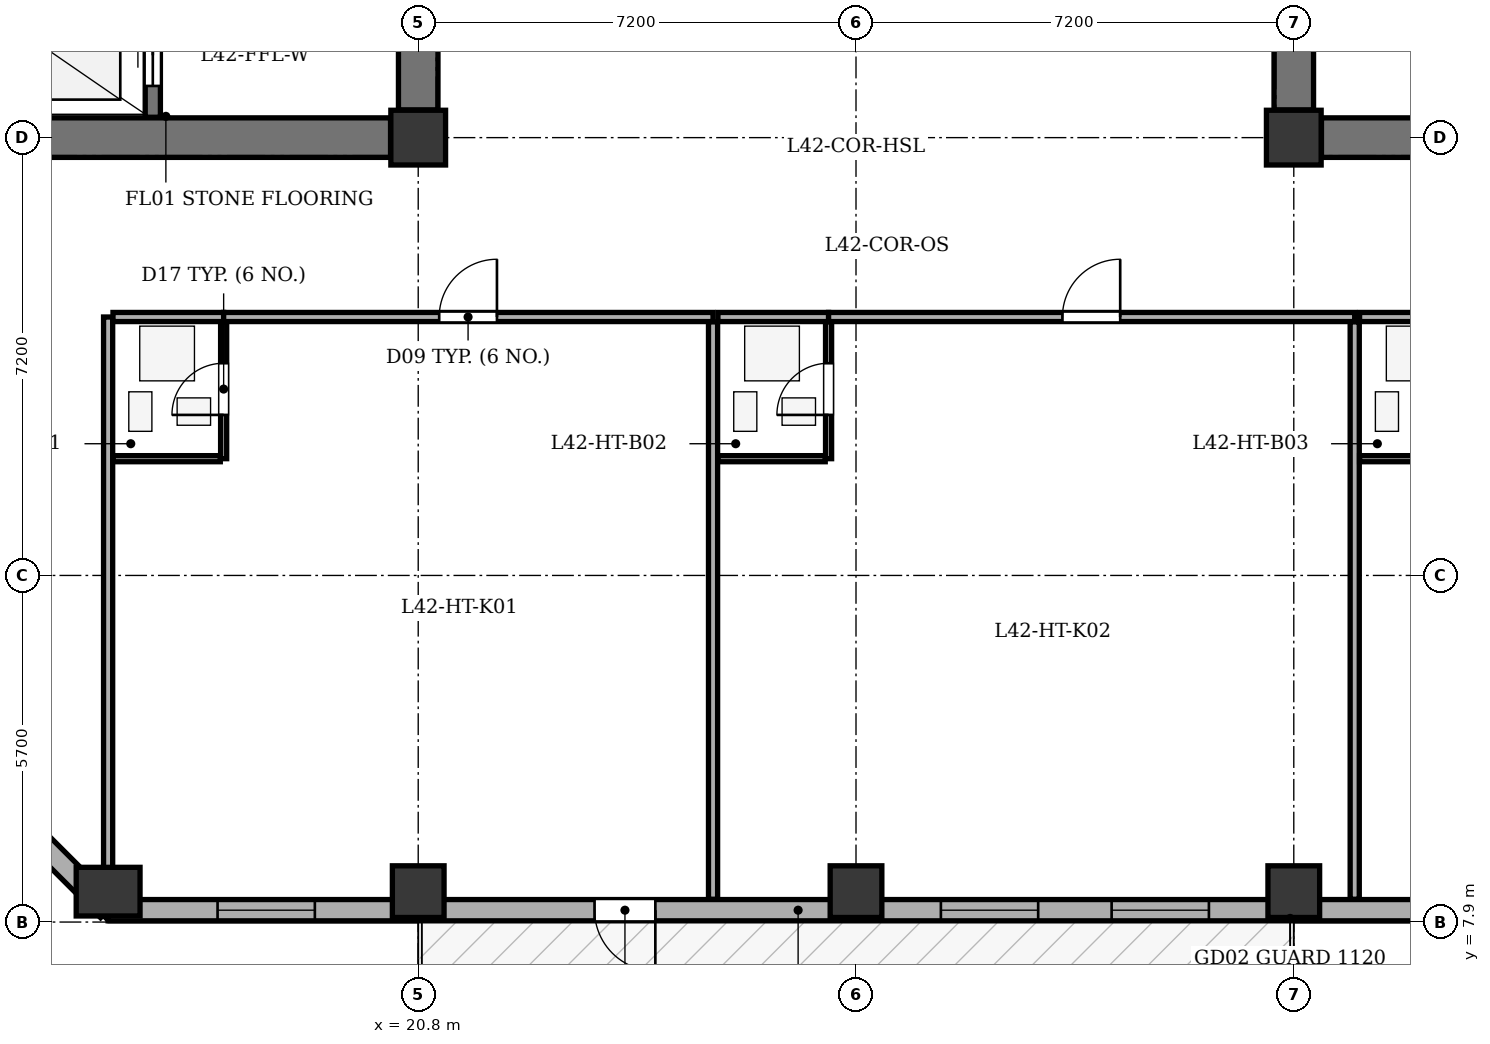
"""IFC4 building model, lengths in metres.
Left out: names, types, materials, properties, quantities, classifications, styles, units other than length and angle.
Written with IfcOpenShell. Run it as: python <this file> out.ifc"""

import sys

from ifc_helpers import new_model, si_unit, direction, frame, frame_2d, origin, origin_2d, place, context, subcontext, project, spatial, rectangle, extrude, element, fill, save


model = new_model("IFC4")
c1 = context("Model", 3, precision=1e-05, world=origin(), true_north=direction((0.0, 1.0)))
c2 = subcontext(c1, "Body", "Model", "MODEL_VIEW")
j1 = project(units=[si_unit("LENGTHUNIT", "METRE"), si_unit("PLANEANGLEUNIT", "RADIAN")], contexts=[c1])
p1 = place(None, origin())
s1 = spatial("IfcSite", under=j1, at=p1, CompositionType="ELEMENT")
p2 = place(p1, origin())
s2 = spatial("IfcBuilding", under=s1, at=p2, CompositionType="ELEMENT")
p3 = place(p2, frame((0.0, 0.0, 165.8)))
s3 = spatial("IfcBuildingStorey", under=s2, at=p3, CompositionType="ELEMENT", Elevation=165.8)
for number, where, z_axis, x_axis in (
    (1, (20.8, 20.8, 0.0), (0.0, 0.0, 1.0), (1.0, 0.0, 0.0)),
    (2, (35.2, 20.8, 0.0), (0.0, 0.0, 1.0), (1.0, 0.0, 0.0)),
):
    element("IfcColumn", number, at=place(p3, frame(where, z_axis=z_axis, x_axis=x_axis)), inside=s3, PredefinedType="COLUMN", context=c2, shape_type="SweptSolid", body=[
        extrude(rectangle(XDim=0.9, YDim=0.9, at=origin_2d()), origin(), (0.0, 0.0, 1.0), 3.5),
    ])
p4 = place(p3, frame((15.7, 8.4, 0.0), z_axis=(0.0, 0.0, 1.0), x_axis=(1.0, 0.0, 0.0)))
e3 = element("IfcColumn", 3, at=p4, inside=s3, PredefinedType="COLUMN", context=c2, shape_type="SweptSolid", body=[
    extrude(rectangle(XDim=0.8, YDim=1.05, at=origin_2d()), origin(), (0.0, 0.0, 1.0), 3.5),
])
for number, where, z_axis, x_axis in (
    (4, (20.8, 8.4, 0.0), (0.0, 0.0, 1.0), (1.0, 0.0, 0.0)),
    (5, (28.0, 8.4, 0.0), (0.0, 0.0, 1.0), (1.0, 0.0, 0.0)),
    (6, (35.2, 8.4, 0.0), (0.0, 0.0, 1.0), (1.0, 0.0, 0.0)),
):
    element("IfcColumn", number, at=place(p3, frame(where, z_axis=z_axis, x_axis=x_axis)), inside=s3, PredefinedType="COLUMN", context=c2, shape_type="SweptSolid", body=[
        extrude(rectangle(XDim=0.85, YDim=0.85, at=origin_2d()), origin(), (0.0, 0.0, 1.0), 3.5),
    ])
p5 = place(p3, frame((50.7, 8.095, 0.0), z_axis=(0.0, 0.0, 1.0), x_axis=(-1.0, 0.0, 0.0)))
e7 = element("IfcWall", 7, at=p5, inside=s3, PredefinedType="STANDARD", context=c2, shape_type="SweptSolid", body=[
    extrude(rectangle(XDim=35.0, YDim=0.35, at=frame_2d((17.5, 0.0))), origin(), (0.0, 0.0, 1.0), 2.785),
])
p6 = place(p5, frame((26.0, 0.0, 0.0)))
e8 = element("IfcOpeningElement", 8, at=p6, cuts=e7, PredefinedType="OPENING", context=c2, shape_type="SweptSolid", body=[
    extrude(rectangle(XDim=1.0, YDim=2.02, at=frame_2d((0.5, 1.01))), frame((0.0, 0.185, 0.0), z_axis=(0.0, -1.0, 0.0), x_axis=(1.0, 0.0, 0.0)), (0.0, 0.0, 1.0), 0.37),
])
p7 = place(p5, frame((1.763, 0.0, 0.75)))
e9 = element("IfcOpeningElement", 9, at=p7, cuts=e7, PredefinedType="OPENING", context=c2, shape_type="SweptSolid", body=[
    extrude(rectangle(XDim=1.6, YDim=1.75, at=frame_2d((0.8, 0.875))), frame((0.0, 0.185, 0.0), z_axis=(0.0, -1.0, 0.0), x_axis=(1.0, 0.0, 0.0)), (0.0, 0.0, 1.0), 0.37),
])
p8 = place(p5, frame((6.798, 0.0, 0.75)))
e10 = element("IfcOpeningElement", 10, at=p8, cuts=e7, PredefinedType="OPENING", context=c2, shape_type="SweptSolid", body=[
    extrude(rectangle(XDim=1.6, YDim=1.75, at=frame_2d((0.8, 0.875))), frame((0.0, 0.185, 0.0), z_axis=(0.0, -1.0, 0.0), x_axis=(1.0, 0.0, 0.0)), (0.0, 0.0, 1.0), 0.37),
])
p9 = place(p5, frame((10.7, 0.0, 0.75)))
e11 = element("IfcOpeningElement", 11, at=p9, cuts=e7, PredefinedType="OPENING", context=c2, shape_type="SweptSolid", body=[
    extrude(rectangle(XDim=2.1, YDim=1.75, at=frame_2d((1.05, 0.875))), frame((0.0, 0.185, 0.0), z_axis=(0.0, -1.0, 0.0), x_axis=(1.0, 0.0, 0.0)), (0.0, 0.0, 1.0), 0.37),
])
p10 = place(p5, frame((16.896, 0.0, 0.75)))
e12 = element("IfcOpeningElement", 12, at=p10, cuts=e7, PredefinedType="OPENING", context=c2, shape_type="SweptSolid", body=[
    extrude(rectangle(XDim=1.6, YDim=1.75, at=frame_2d((0.8, 0.875))), frame((0.0, 0.185, 0.0), z_axis=(0.0, -1.0, 0.0), x_axis=(1.0, 0.0, 0.0)), (0.0, 0.0, 1.0), 0.37),
])
p11 = place(p5, frame((19.704, 0.0, 0.75)))
e13 = element("IfcOpeningElement", 13, at=p11, cuts=e7, PredefinedType="OPENING", context=c2, shape_type="SweptSolid", body=[
    extrude(rectangle(XDim=1.6, YDim=1.75, at=frame_2d((0.8, 0.875))), frame((0.0, 0.185, 0.0), z_axis=(0.0, -1.0, 0.0), x_axis=(1.0, 0.0, 0.0)), (0.0, 0.0, 1.0), 0.37),
])
p12 = place(p5, frame((31.6, 0.0, 0.75)))
e14 = element("IfcOpeningElement", 14, at=p12, cuts=e7, PredefinedType="OPENING", context=c2, shape_type="SweptSolid", body=[
    extrude(rectangle(XDim=1.6, YDim=1.75, at=frame_2d((0.8, 0.875))), frame((0.0, 0.185, 0.0), z_axis=(0.0, -1.0, 0.0), x_axis=(1.0, 0.0, 0.0)), (0.0, 0.0, 1.0), 0.37),
])
p13 = place(p3, frame((15.7, 8.095, 0.0), z_axis=(0.0, 0.0, 1.0), x_axis=(-0.707106781187, 0.707106781187, 0.0)))
e15 = element("IfcWall", 15, at=p13, inside=s3, PredefinedType="STANDARD", context=c2, shape_type="SweptSolid", body=[
    extrude(rectangle(XDim=6.795, YDim=0.35, at=frame_2d((3.397, 0.0))), origin(), (0.0, 0.0, 1.0), 2.785),
])
p14 = place(p13, frame((2.698, 0.0, 0.75)))
e16 = element("IfcOpeningElement", 16, at=p14, cuts=e15, PredefinedType="OPENING", context=c2, shape_type="SweptSolid", body=[
    extrude(rectangle(XDim=1.4, YDim=1.65, at=frame_2d((0.7, 0.825))), frame((0.0, 0.185, 0.0), z_axis=(0.0, -1.0, 0.0), x_axis=(1.0, 0.0, 0.0)), (0.0, 0.0, 1.0), 0.37),
])
p15 = place(p3, frame((13.255, 20.8, 0.0), z_axis=(0.0, 0.0, 1.0), x_axis=(1.0, 0.0, 0.0)))
e17 = element("IfcWall", 17, at=p15, inside=s3, PredefinedType="SHEAR", context=c2, shape_type="SweptSolid", body=[
    extrude(rectangle(XDim=7.09, YDim=0.65, at=frame_2d((3.545, 0.0))), origin(), (0.0, 0.0, 1.0), 3.2),
])
p16 = place(p3, frame((20.8, 21.255, 0.0), z_axis=(0.0, 0.0, 1.0), x_axis=(0.0, 1.0, 0.0)))
e18 = element("IfcWall", 18, at=p16, inside=s3, PredefinedType="SHEAR", context=c2, shape_type="SweptSolid", body=[
    extrude(rectangle(XDim=3.795, YDim=0.65, at=frame_2d((1.897, 0.0))), origin(), (0.0, 0.0, 1.0), 3.2),
])
p17 = place(p16, frame((1.345, 0.0, 0.0)))
e19 = element("IfcOpeningElement", 19, at=p17, cuts=e18, PredefinedType="OPENING", context=c2, shape_type="SweptSolid", body=[
    extrude(rectangle(XDim=1.2, YDim=2.15, at=frame_2d((0.6, 1.075))), frame((0.0, 0.335, 0.0), z_axis=(0.0, -1.0, 0.0), x_axis=(1.0, 0.0, 0.0)), (0.0, 0.0, 1.0), 0.67),
])
p18 = place(p3, frame((16.435, 21.135, 0.0), z_axis=(0.0, 0.0, 1.0), x_axis=(0.0, 1.0, 0.0)))
e20 = element("IfcWall", 20, at=p18, inside=s3, PredefinedType="SHEAR", context=c2, shape_type="SweptSolid", body=[
    extrude(rectangle(XDim=12.13, YDim=0.25, at=frame_2d((6.065, 0.0))), origin(), (0.0, 0.0, 1.0), 3.2),
])
p19 = place(p18, frame((0.515, 0.0, 0.0)))
e21 = element("IfcOpeningElement", 21, at=p19, cuts=e20, PredefinedType="OPENING", context=c2, shape_type="SweptSolid", body=[
    extrude(rectangle(XDim=1.2, YDim=2.15, at=frame_2d((0.6, 1.075))), frame((0.0, 0.135, 0.0), z_axis=(0.0, -1.0, 0.0), x_axis=(1.0, 0.0, 0.0)), (0.0, 0.0, 1.0), 0.27),
])
p20 = place(p18, frame((2.665, 0.0, 0.0)))
e22 = element("IfcOpeningElement", 22, at=p20, cuts=e20, PredefinedType="OPENING", context=c2, shape_type="SweptSolid", body=[
    extrude(rectangle(XDim=1.15, YDim=2.15, at=frame_2d((0.575, 1.075))), frame((0.0, 0.135, 0.0), z_axis=(0.0, -1.0, 0.0), x_axis=(1.0, 0.0, 0.0)), (0.0, 0.0, 1.0), 0.27),
])
p21 = place(p3, frame((35.655, 20.8, 0.0), z_axis=(0.0, 0.0, 1.0), x_axis=(1.0, 0.0, 0.0)))
e23 = element("IfcWall", 23, at=p21, inside=s3, PredefinedType="SHEAR", context=c2, shape_type="SweptSolid", body=[
    extrude(rectangle(XDim=7.09, YDim=0.65, at=frame_2d((3.545, 0.0))), origin(), (0.0, 0.0, 1.0), 3.2),
])
p22 = place(p3, frame((35.2, 21.255, 0.0), z_axis=(0.0, 0.0, 1.0), x_axis=(0.0, 1.0, 0.0)))
e24 = element("IfcWall", 24, at=p22, inside=s3, PredefinedType="SHEAR", context=c2, shape_type="SweptSolid", body=[
    extrude(rectangle(XDim=11.89, YDim=0.65, at=frame_2d((5.945, 0.0))), origin(), (0.0, 0.0, 1.0), 3.2),
])
p23 = place(p22, frame((1.345, 0.0, 0.0)))
e25 = element("IfcOpeningElement", 25, at=p23, cuts=e24, PredefinedType="OPENING", context=c2, shape_type="SweptSolid", body=[
    extrude(rectangle(XDim=1.2, YDim=2.15, at=frame_2d((0.6, 1.075))), frame((0.0, 0.335, 0.0), z_axis=(0.0, -1.0, 0.0), x_axis=(1.0, 0.0, 0.0)), (0.0, 0.0, 1.0), 0.67),
])
p24 = place(p22, frame((4.345, 0.0, 0.0)))
e26 = element("IfcOpeningElement", 26, at=p24, cuts=e24, PredefinedType="OPENING", context=c2, shape_type="SweptSolid", body=[
    extrude(rectangle(XDim=1.1, YDim=2.1, at=frame_2d((0.55, 1.05))), frame((0.0, 0.335, 0.0), z_axis=(0.0, -1.0, 0.0), x_axis=(1.0, 0.0, 0.0)), (0.0, 0.0, 1.0), 0.67),
])
p25 = place(p22, frame((6.295, 0.0, 0.0)))
e27 = element("IfcOpeningElement", 27, at=p25, cuts=e24, PredefinedType="OPENING", context=c2, shape_type="SweptSolid", body=[
    extrude(rectangle(XDim=1.1, YDim=2.1, at=frame_2d((0.55, 1.05))), frame((0.0, 0.335, 0.0), z_axis=(0.0, -1.0, 0.0), x_axis=(1.0, 0.0, 0.0)), (0.0, 0.0, 1.0), 0.67),
])
p26 = place(p22, frame((8.245, 0.0, 0.0)))
e28 = element("IfcOpeningElement", 28, at=p26, cuts=e24, PredefinedType="OPENING", context=c2, shape_type="SweptSolid", body=[
    extrude(rectangle(XDim=1.1, YDim=2.1, at=frame_2d((0.55, 1.05))), frame((0.0, 0.335, 0.0), z_axis=(0.0, -1.0, 0.0), x_axis=(1.0, 0.0, 0.0)), (0.0, 0.0, 1.0), 0.67),
])
p27 = place(p3, frame((15.7, 8.275, 0.0), z_axis=(0.0, 0.0, 1.0), x_axis=(0.0, 1.0, 0.0)))
e29 = element("IfcWall", 29, at=p27, inside=s3, PredefinedType="PARTITIONING", context=c2, shape_type="SweptSolid", body=[
    extrude(rectangle(XDim=9.575, YDim=0.15, at=frame_2d((4.788, 0.0))), origin(), (0.0, 0.0, 1.0), 3.2),
])
p28 = place(p3, frame((15.78, 17.85, 0.0), z_axis=(0.0, 0.0, 1.0), x_axis=(1.0, 0.0, 0.0)))
e30 = element("IfcWall", 30, at=p28, inside=s3, PredefinedType="PARTITIONING", context=c2, shape_type="SweptSolid", body=[
    extrude(rectangle(XDim=1.82, YDim=0.15, at=frame_2d((0.91, 0.0))), origin(), (0.0, 0.0, 1.0), 3.2),
])
p29 = place(p3, frame((17.6, 17.85, 0.0), z_axis=(0.0, 0.0, 1.0), x_axis=(1.0, 0.0, 0.0)))
e31 = element("IfcWall", 31, at=p29, inside=s3, PredefinedType="PARTITIONING", context=c2, shape_type="SweptSolid", body=[
    extrude(rectangle(XDim=8.049, YDim=0.15, at=frame_2d((4.024, 0.0))), origin(), (0.0, 0.0, 1.0), 3.2),
])
p30 = place(p29, frame((3.545, 0.0, 0.0)))
e32 = element("IfcOpeningElement", 32, at=p30, cuts=e31, PredefinedType="OPENING", context=c2, shape_type="SweptSolid", body=[
    extrude(rectangle(XDim=0.95, YDim=2.1, at=frame_2d((0.475, 1.05))), frame((0.0, 0.085, 0.0), z_axis=(0.0, -1.0, 0.0), x_axis=(1.0, 0.0, 0.0)), (0.0, 0.0, 1.0), 0.17),
])
p31 = place(p3, frame((17.6, 15.52, 0.0), z_axis=(0.0, 0.0, 1.0), x_axis=(0.0, 1.0, 0.0)))
e33 = element("IfcWall", 33, at=p31, inside=s3, PredefinedType="PARTITIONING", context=c2, shape_type="SweptSolid", body=[
    extrude(rectangle(XDim=2.25, YDim=0.1, at=frame_2d((1.125, 0.0))), origin(), (0.0, 0.0, 1.0), 3.2),
])
p32 = place(p31, frame((0.72, 0.0, 0.0)))
e34 = element("IfcOpeningElement", 34, at=p32, cuts=e33, PredefinedType="OPENING", context=c2, shape_type="SweptSolid", body=[
    extrude(rectangle(XDim=0.85, YDim=2.05, at=frame_2d((0.425, 1.025))), frame((0.0, 0.06, 0.0), z_axis=(0.0, -1.0, 0.0), x_axis=(1.0, 0.0, 0.0)), (0.0, 0.0, 1.0), 0.12),
])
p33 = place(p3, frame((15.78, 15.52, 0.0), z_axis=(0.0, 0.0, 1.0), x_axis=(1.0, 0.0, 0.0)))
e35 = element("IfcWall", 35, at=p33, inside=s3, PredefinedType="PARTITIONING", context=c2, shape_type="SweptSolid", body=[
    extrude(rectangle(XDim=1.765, YDim=0.1, at=frame_2d((0.882, 0.0))), origin(), (0.0, 0.0, 1.0), 3.2),
])
p34 = place(p3, frame((25.649, 8.275, 0.0), z_axis=(0.0, 0.0, 1.0), x_axis=(0.0, 1.0, 0.0)))
e36 = element("IfcWall", 36, at=p34, inside=s3, PredefinedType="PARTITIONING", context=c2, shape_type="SweptSolid", body=[
    extrude(rectangle(XDim=9.495, YDim=0.15, at=frame_2d((4.748, 0.0))), origin(), (0.0, 0.0, 1.0), 3.2),
])
p35 = place(p3, frame((25.729, 17.85, 0.0), z_axis=(0.0, 0.0, 1.0), x_axis=(1.0, 0.0, 0.0)))
e37 = element("IfcWall", 37, at=p35, inside=s3, PredefinedType="PARTITIONING", context=c2, shape_type="SweptSolid", body=[
    extrude(rectangle(XDim=1.82, YDim=0.15, at=frame_2d((0.91, 0.0))), origin(), (0.0, 0.0, 1.0), 3.2),
])
p36 = place(p3, frame((27.549, 17.85, 0.0), z_axis=(0.0, 0.0, 1.0), x_axis=(1.0, 0.0, 0.0)))
e38 = element("IfcWall", 38, at=p36, inside=s3, PredefinedType="PARTITIONING", context=c2, shape_type="SweptSolid", body=[
    extrude(rectangle(XDim=8.653, YDim=0.15, at=frame_2d((4.326, 0.0))), origin(), (0.0, 0.0, 1.0), 3.2),
])
p37 = place(p36, frame((3.846, 0.0, 0.0)))
e39 = element("IfcOpeningElement", 39, at=p37, cuts=e38, PredefinedType="OPENING", context=c2, shape_type="SweptSolid", body=[
    extrude(rectangle(XDim=0.95, YDim=2.1, at=frame_2d((0.475, 1.05))), frame((0.0, 0.085, 0.0), z_axis=(0.0, -1.0, 0.0), x_axis=(1.0, 0.0, 0.0)), (0.0, 0.0, 1.0), 0.17),
])
p38 = place(p3, frame((27.549, 15.52, 0.0), z_axis=(0.0, 0.0, 1.0), x_axis=(0.0, 1.0, 0.0)))
e40 = element("IfcWall", 40, at=p38, inside=s3, PredefinedType="PARTITIONING", context=c2, shape_type="SweptSolid", body=[
    extrude(rectangle(XDim=2.25, YDim=0.1, at=frame_2d((1.125, 0.0))), origin(), (0.0, 0.0, 1.0), 3.2),
])
p39 = place(p38, frame((0.72, 0.0, 0.0)))
e41 = element("IfcOpeningElement", 41, at=p39, cuts=e40, PredefinedType="OPENING", context=c2, shape_type="SweptSolid", body=[
    extrude(rectangle(XDim=0.85, YDim=2.05, at=frame_2d((0.425, 1.025))), frame((0.0, 0.06, 0.0), z_axis=(0.0, -1.0, 0.0), x_axis=(1.0, 0.0, 0.0)), (0.0, 0.0, 1.0), 0.12),
])
p40 = place(p3, frame((25.729, 15.52, 0.0), z_axis=(0.0, 0.0, 1.0), x_axis=(1.0, 0.0, 0.0)))
e42 = element("IfcWall", 42, at=p40, inside=s3, PredefinedType="PARTITIONING", context=c2, shape_type="SweptSolid", body=[
    extrude(rectangle(XDim=1.765, YDim=0.1, at=frame_2d((0.882, 0.0))), origin(), (0.0, 0.0, 1.0), 3.2),
])
p41 = place(p3, frame((36.202, 8.275, 0.0), z_axis=(0.0, 0.0, 1.0), x_axis=(0.0, 1.0, 0.0)))
e43 = element("IfcWall", 43, at=p41, inside=s3, PredefinedType="PARTITIONING", context=c2, shape_type="SweptSolid", body=[
    extrude(rectangle(XDim=9.495, YDim=0.15, at=frame_2d((4.748, 0.0))), origin(), (0.0, 0.0, 1.0), 3.2),
])
p42 = place(p3, frame((36.282, 17.85, 0.0), z_axis=(0.0, 0.0, 1.0), x_axis=(1.0, 0.0, 0.0)))
e44 = element("IfcWall", 44, at=p42, inside=s3, PredefinedType="PARTITIONING", context=c2, shape_type="SweptSolid", body=[
    extrude(rectangle(XDim=1.82, YDim=0.15, at=frame_2d((0.91, 0.0))), origin(), (0.0, 0.0, 1.0), 3.2),
])
p43 = place(p3, frame((36.282, 15.52, 0.0), z_axis=(0.0, 0.0, 1.0), x_axis=(1.0, 0.0, 0.0)))
e45 = element("IfcWall", 45, at=p43, inside=s3, PredefinedType="PARTITIONING", context=c2, shape_type="SweptSolid", body=[
    extrude(rectangle(XDim=1.765, YDim=0.1, at=frame_2d((0.883, 0.0))), origin(), (0.0, 0.0, 1.0), 3.2),
])
p44 = place(p6, origin())
e46 = element("IfcDoor", 46, at=p44, inside=s3, OperationType="SINGLE_SWING_LEFT", PredefinedType="DOOR", context=c2, shape_type="SweptSolid", body=[
    extrude(rectangle(XDim=1.0, YDim=2.02, at=frame_2d((0.5, 1.01))), frame((0.0, 0.025, 0.0), z_axis=(0.0, -1.0, 0.0), x_axis=(1.0, 0.0, 0.0)), (0.0, 0.0, 1.0), 0.05),
])
fill(e8, e46)
p45 = place(p10, origin())
e47 = element("IfcWindow", 47, at=p45, inside=s3, PartitioningType="SINGLE_PANEL", PredefinedType="WINDOW", context=c2, shape_type="SweptSolid", body=[
    extrude(rectangle(XDim=1.6, YDim=1.75, at=frame_2d((0.8, 0.875))), frame((0.0, -0.01, 0.0), z_axis=(0.0, -1.0, 0.0), x_axis=(1.0, 0.0, 0.0)), (0.0, 0.0, 1.0), 0.06),
])
fill(e12, e47)
p46 = place(p11, origin())
e48 = element("IfcWindow", 48, at=p46, inside=s3, PartitioningType="SINGLE_PANEL", PredefinedType="WINDOW", context=c2, shape_type="SweptSolid", body=[
    extrude(rectangle(XDim=1.6, YDim=1.75, at=frame_2d((0.8, 0.875))), frame((0.0, -0.01, 0.0), z_axis=(0.0, -1.0, 0.0), x_axis=(1.0, 0.0, 0.0)), (0.0, 0.0, 1.0), 0.06),
])
fill(e13, e48)
p47 = place(p12, origin())
e49 = element("IfcWindow", 49, at=p47, inside=s3, PartitioningType="SINGLE_PANEL", PredefinedType="WINDOW", context=c2, shape_type="SweptSolid", body=[
    extrude(rectangle(XDim=1.6, YDim=1.75, at=frame_2d((0.8, 0.875))), frame((0.0, -0.01, 0.0), z_axis=(0.0, -1.0, 0.0), x_axis=(1.0, 0.0, 0.0)), (0.0, 0.0, 1.0), 0.06),
])
fill(e14, e49)
p48 = place(p19, origin())
e50 = element("IfcDoor", 50, at=p48, inside=s3, OperationType="DOUBLE_DOOR_SLIDING", PredefinedType="DOOR", context=c2, shape_type="SweptSolid", body=[
    extrude(rectangle(XDim=1.2, YDim=2.15, at=frame_2d((0.6, 1.075))), frame((0.0, 0.025, 0.0), z_axis=(0.0, -1.0, 0.0), x_axis=(1.0, 0.0, 0.0)), (0.0, 0.0, 1.0), 0.05),
])
fill(e21, e50)
p49 = place(p32, origin())
e51 = element("IfcDoor", 51, at=p49, inside=s3, OperationType="SINGLE_SWING_LEFT", PredefinedType="DOOR", context=c2, shape_type="SweptSolid", body=[
    extrude(rectangle(XDim=0.85, YDim=2.05, at=frame_2d((0.425, 1.025))), frame((0.0, 0.025, 0.0), z_axis=(0.0, -1.0, 0.0), x_axis=(1.0, 0.0, 0.0)), (0.0, 0.0, 1.0), 0.05),
])
fill(e34, e51)
p50 = place(p30, origin())
e52 = element("IfcDoor", 52, at=p50, inside=s3, OperationType="SINGLE_SWING_RIGHT", PredefinedType="DOOR", context=c2, shape_type="SweptSolid", body=[
    extrude(rectangle(XDim=0.95, YDim=2.1, at=frame_2d((0.475, 1.05))), frame((0.0, 0.025, 0.0), z_axis=(0.0, -1.0, 0.0), x_axis=(1.0, 0.0, 0.0)), (0.0, 0.0, 1.0), 0.05),
])
fill(e32, e52)
p51 = place(p39, origin())
e53 = element("IfcDoor", 53, at=p51, inside=s3, OperationType="SINGLE_SWING_LEFT", PredefinedType="DOOR", context=c2, shape_type="SweptSolid", body=[
    extrude(rectangle(XDim=0.85, YDim=2.05, at=frame_2d((0.425, 1.025))), frame((0.0, 0.025, 0.0), z_axis=(0.0, -1.0, 0.0), x_axis=(1.0, 0.0, 0.0)), (0.0, 0.0, 1.0), 0.05),
])
fill(e41, e53)
p52 = place(p37, origin())
e54 = element("IfcDoor", 54, at=p52, inside=s3, OperationType="SINGLE_SWING_RIGHT", PredefinedType="DOOR", context=c2, shape_type="SweptSolid", body=[
    extrude(rectangle(XDim=0.95, YDim=2.1, at=frame_2d((0.475, 1.05))), frame((0.0, 0.025, 0.0), z_axis=(0.0, -1.0, 0.0), x_axis=(1.0, 0.0, 0.0)), (0.0, 0.0, 1.0), 0.05),
])
fill(e39, e54)
save(model, sys.argv[1])
